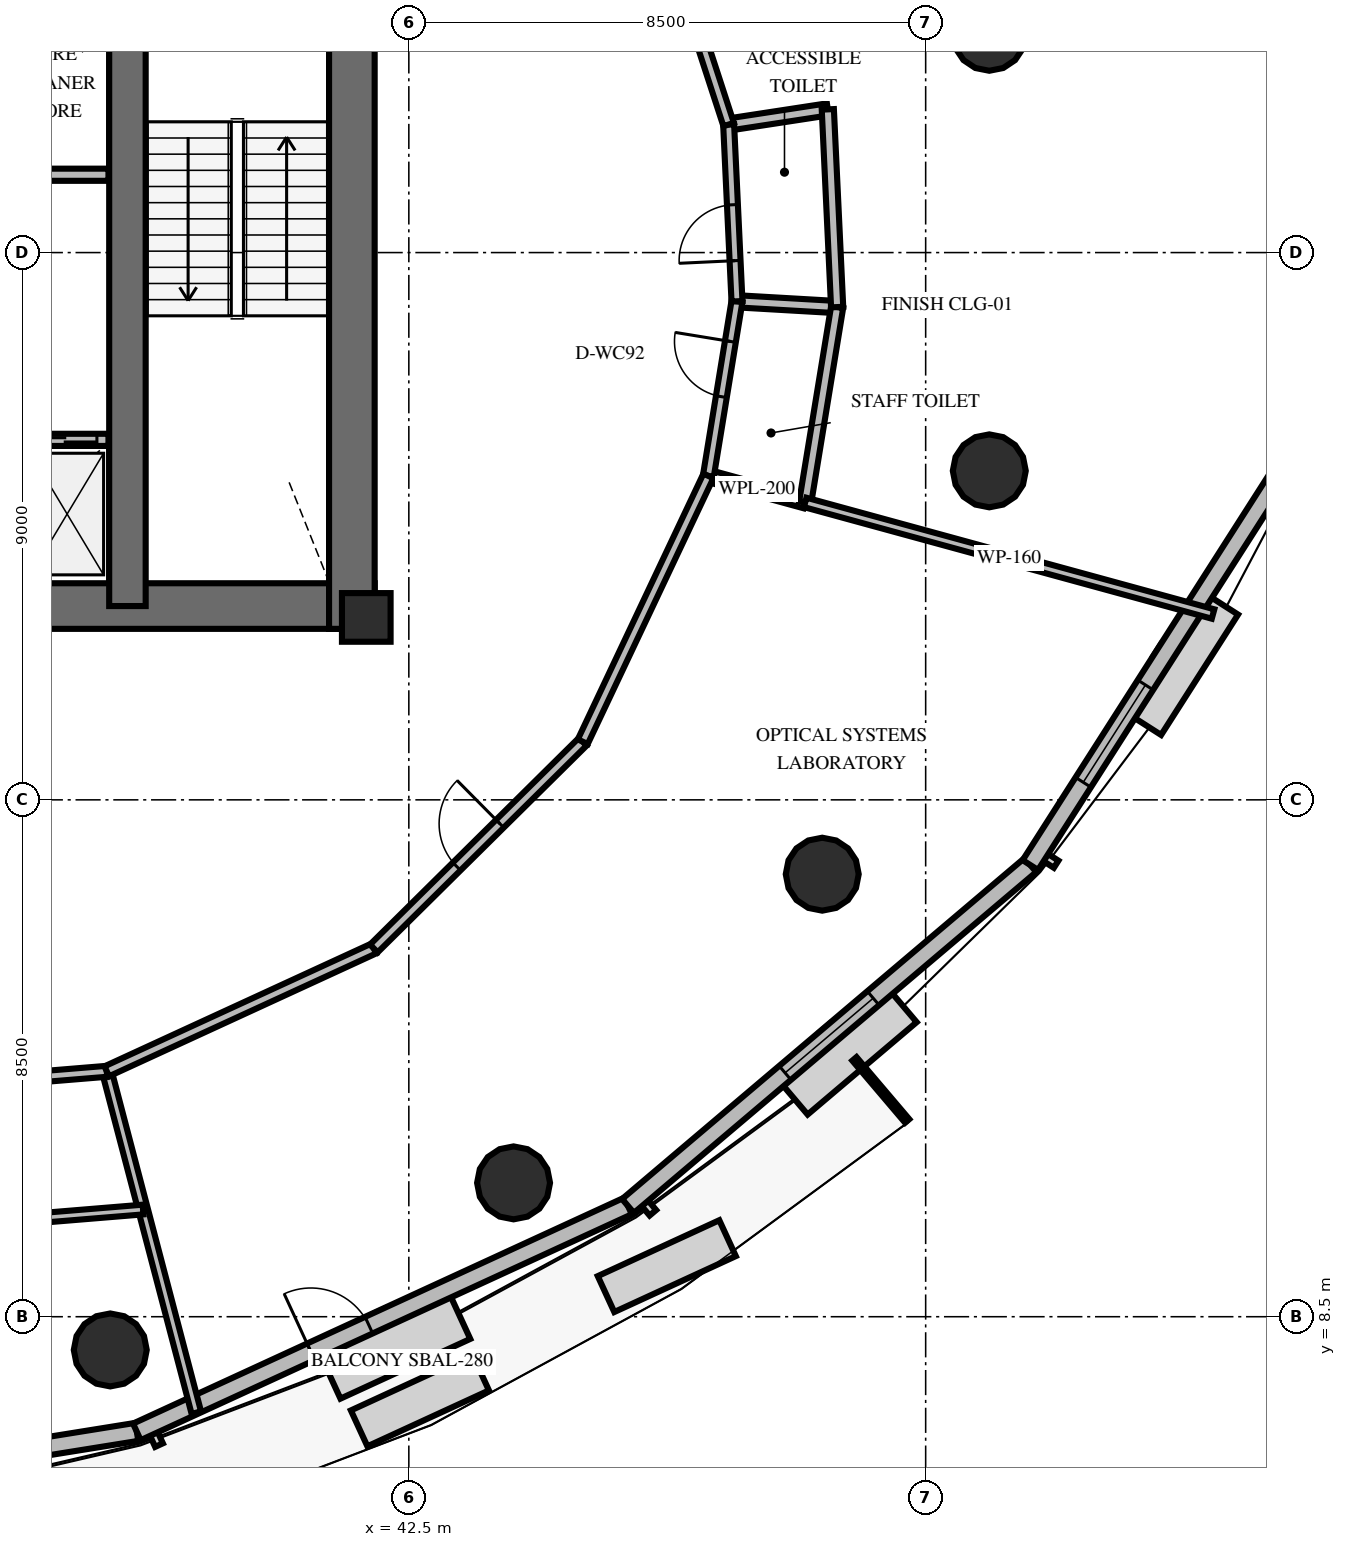
"""IFC4 building model, lengths in metres.
Left out: names, types, materials, properties, quantities, classifications, styles, units other than length and angle.
Written with IfcOpenShell. Run it as: python <this file> out.ifc"""

import sys

from ifc_helpers import new_model, si_unit, direction, frame, frame_2d, origin, origin_2d, place, context, subcontext, project, spatial, rectangle, circle, extrude, element, fill, save


model = new_model("IFC4")
c1 = context("Model", 3, precision=1e-05, world=origin(), true_north=direction((0.0, 1.0)))
c2 = subcontext(c1, "Body", "Model", "MODEL_VIEW")
j1 = project(units=[si_unit("LENGTHUNIT", "METRE"), si_unit("PLANEANGLEUNIT", "RADIAN")], contexts=[c1])
p1 = place(None, origin())
s1 = spatial("IfcSite", under=j1, at=p1, CompositionType="ELEMENT")
p2 = place(p1, origin())
s2 = spatial("IfcBuilding", under=s1, at=p2, CompositionType="ELEMENT")
p3 = place(p2, frame((0.0, 0.0, 137.8)))
s3 = spatial("IfcBuildingStorey", under=s2, at=p3, CompositionType="ELEMENT", Elevation=137.8)
p4 = place(p3, frame((26.072, 20.187, 0.0), z_axis=(0.0, 0.0, 1.0), x_axis=(1.0, 0.0, 0.0)))
e1 = element("IfcWall", 1, at=p4, inside=s3, PredefinedType="SHEAR", context=c2, shape_type="SweptSolid", body=[
    extrude(rectangle(XDim=15.866, YDim=0.75, at=frame_2d((7.933, 0.0))), origin(), (0.0, 0.0, 1.0), 4.0),
])
p5 = place(p3, frame((41.563, 19.812, 0.0), z_axis=(0.0, 0.0, 1.0), x_axis=(0.0, 1.0, 0.0)))
e2 = element("IfcWall", 2, at=p5, inside=s3, PredefinedType="SHEAR", context=c2, shape_type="SweptSolid", body=[
    extrude(rectangle(XDim=10.576, YDim=0.75, at=frame_2d((5.288, 0.0))), origin(), (0.0, 0.0, 1.0), 4.0),
])
p6 = place(p3, frame((37.872, 20.187, 0.0), z_axis=(0.0, 0.0, 1.0), x_axis=(0.0, 1.0, 0.0)))
e3 = element("IfcWall", 3, at=p6, inside=s3, PredefinedType="SHEAR", context=c2, shape_type="SweptSolid", body=[
    extrude(rectangle(XDim=9.826, YDim=0.6, at=frame_2d((4.913, 0.0))), origin(), (0.0, 0.0, 1.0), 4.0),
])
p7 = place(p3, frame((41.8, 20.0, 0.0), z_axis=(0.0, 0.0, 1.0), x_axis=(1.0, 0.0, 0.0)))
e4 = element("IfcColumn", 4, at=p7, inside=s3, PredefinedType="PILASTER", context=c2, shape_type="SweptSolid", body=[
    extrude(rectangle(XDim=0.8, YDim=0.8, at=origin_2d()), origin(), (0.0, 0.0, 1.0), 4.0),
])
for number, where, z_axis, x_axis in (
    (5, (52.046, 29.59, 0.0), (0.0, 0.0, 1.0), (1.0, 0.0, 0.0)),
    (6, (37.59, 7.954, 0.0), (0.0, 0.0, 1.0), (1.0, 0.0, 0.0)),
    (7, (44.222, 10.701, 0.0), (0.0, 0.0, 1.0), (1.0, 0.0, 0.0)),
    (8, (49.299, 15.778, 0.0), (0.0, 0.0, 1.0), (1.0, 0.0, 0.0)),
    (9, (52.046, 22.41, 0.0), (0.0, 0.0, 1.0), (1.0, 0.0, 0.0)),
):
    element("IfcColumn", number, at=place(p3, frame(where, z_axis=z_axis, x_axis=x_axis)), inside=s3, PredefinedType="COLUMN", context=c2, shape_type="SweptSolid", body=[
        extrude(circle(Radius=0.6, at=origin_2d()), origin(), (0.0, 0.0, 1.0), 4.0),
    ])
p8 = place(p3, frame((29.464, 5.23, 0.0), z_axis=(0.0, 0.0, 1.0), x_axis=(0.987334308652, 0.158653594217, 0.0)))
e10 = element("IfcWall", 10, at=p8, inside=s3, PredefinedType="SOLIDWALL", context=c2, shape_type="SweptSolid", body=[
    extrude(rectangle(XDim=8.673, YDim=0.3, at=frame_2d((4.336, 0.0))), origin(), (0.0, 0.0, 1.0), 2.9),
])
p9 = place(p8, frame((3.386, 0.0, 0.8)))
e11 = element("IfcOpeningElement", 11, at=p9, cuts=e10, PredefinedType="OPENING", context=c2, shape_type="SweptSolid", body=[
    extrude(rectangle(XDim=1.9, YDim=1.95, at=frame_2d((0.95, 0.975))), frame((0.0, 0.16, 0.0), z_axis=(0.0, -1.0, 0.0), x_axis=(1.0, 0.0, 0.0)), (0.0, 0.0, 1.0), 0.32),
])
p10 = place(p3, frame((38.027, 6.606, 0.0), z_axis=(0.0, 0.0, 1.0), x_axis=(0.908512345051, 0.417858012835, 0.0)))
e12 = element("IfcWall", 12, at=p10, inside=s3, PredefinedType="SOLIDWALL", context=c2, shape_type="SweptSolid", body=[
    extrude(rectangle(XDim=8.891, YDim=0.3, at=frame_2d((4.445, 0.0))), origin(), (0.0, 0.0, 1.0), 2.9),
])
p11 = place(p10, frame((3.15, 0.0, 0.0)))
e13 = element("IfcOpeningElement", 13, at=p11, cuts=e12, PredefinedType="OPENING", context=c2, shape_type="SweptSolid", body=[
    extrude(rectangle(XDim=1.05, YDim=2.15, at=frame_2d((0.525, 1.075))), frame((0.0, 0.16, 0.0), z_axis=(0.0, -1.0, 0.0), x_axis=(1.0, 0.0, 0.0)), (0.0, 0.0, 1.0), 0.32),
])
p12 = place(p3, frame((46.104, 10.321, 0.0), z_axis=(0.0, 0.0, 1.0), x_axis=(0.762985724951, 0.646415333606, 0.0)))
e14 = element("IfcWall", 14, at=p12, inside=s3, PredefinedType="SOLIDWALL", context=c2, shape_type="SweptSolid", body=[
    extrude(rectangle(XDim=8.673, YDim=0.3, at=frame_2d((4.336, 0.0))), origin(), (0.0, 0.0, 1.0), 2.9),
])
p13 = place(p12, frame((3.386, 0.0, 0.8)))
e15 = element("IfcOpeningElement", 15, at=p13, cuts=e14, PredefinedType="OPENING", context=c2, shape_type="SweptSolid", body=[
    extrude(rectangle(XDim=1.9, YDim=1.95, at=frame_2d((0.95, 0.975))), frame((0.0, 0.16, 0.0), z_axis=(0.0, -1.0, 0.0), x_axis=(1.0, 0.0, 0.0)), (0.0, 0.0, 1.0), 0.32),
])
p14 = place(p3, frame((52.722, 15.927, 0.0), z_axis=(0.0, 0.0, 1.0), x_axis=(0.538505872867, 0.842621756714, 0.0)))
e16 = element("IfcWall", 16, at=p14, inside=s3, PredefinedType="SOLIDWALL", context=c2, shape_type="SweptSolid", body=[
    extrude(rectangle(XDim=8.095, YDim=0.3, at=frame_2d((4.048, 0.0))), origin(), (0.0, 0.0, 1.0), 2.9),
])
p15 = place(p14, frame((1.615, 0.0, 0.8)))
e17 = element("IfcOpeningElement", 17, at=p15, cuts=e16, PredefinedType="OPENING", context=c2, shape_type="SweptSolid", body=[
    extrude(rectangle(XDim=1.9, YDim=1.95, at=frame_2d((0.95, 0.975))), frame((0.0, 0.16, 0.0), z_axis=(0.0, -1.0, 0.0), x_axis=(1.0, 0.0, 0.0)), (0.0, 0.0, 1.0), 0.32),
])
p16 = place(p3, frame((34.75, 22.92, 0.0), z_axis=(0.0, 0.0, 1.0), x_axis=(1.0, 0.0, 0.0)))
e18 = element("IfcWall", 18, at=p16, inside=s3, PredefinedType="SOLIDWALL", context=c2, shape_type="SweptSolid", body=[
    extrude(rectangle(XDim=2.81, YDim=0.2, at=frame_2d((1.405, 0.0))), origin(), (0.0, 0.0, 1.0), 2.8),
])
p17 = place(p16, frame((0.19, 0.0, 0.0)))
e19 = element("IfcOpeningElement", 19, at=p17, cuts=e18, PredefinedType="OPENING", context=c2, shape_type="SweptSolid", body=[
    extrude(rectangle(XDim=1.05, YDim=2.1, at=frame_2d((0.525, 1.05))), frame((0.0, 0.11, 0.0), z_axis=(0.0, -1.0, 0.0), x_axis=(1.0, 0.0, 0.0)), (0.0, 0.0, 1.0), 0.22),
])
p18 = place(p16, frame((1.57, 0.0, 0.0)))
e20 = element("IfcOpeningElement", 20, at=p18, cuts=e18, PredefinedType="OPENING", context=c2, shape_type="SweptSolid", body=[
    extrude(rectangle(XDim=1.05, YDim=2.1, at=frame_2d((0.525, 1.05))), frame((0.0, 0.11, 0.0), z_axis=(0.0, -1.0, 0.0), x_axis=(1.0, 0.0, 0.0)), (0.0, 0.0, 1.0), 0.22),
])
p19 = place(p3, frame((34.75, 27.28, 0.0), z_axis=(0.0, 0.0, 1.0), x_axis=(1.0, 0.0, 0.0)))
e21 = element("IfcWall", 21, at=p19, inside=s3, PredefinedType="SOLIDWALL", context=c2, shape_type="SweptSolid", body=[
    extrude(rectangle(XDim=2.81, YDim=0.2, at=frame_2d((1.405, 0.0))), origin(), (0.0, 0.0, 1.0), 2.8),
])
p20 = place(p3, frame((47.427, 22.327, 0.0), z_axis=(0.0, 0.0, 1.0), x_axis=(0.96458264851, -0.2637808071, 0.0)))
e22 = element("IfcWall", 22, at=p20, inside=s3, PredefinedType="PLUMBINGWALL", context=c2, shape_type="SweptSolid", body=[
    extrude(rectangle(XDim=1.65, YDim=0.2, at=frame_2d((0.825, 0.0))), origin(), (0.0, 0.0, 1.0), 2.8),
])
p21 = place(p3, frame((47.897, 25.199, 0.0), z_axis=(0.0, 0.0, 1.0), x_axis=(0.998342068073, -0.0575596657, 0.0)))
e23 = element("IfcWall", 23, at=p21, inside=s3, PredefinedType="PLUMBINGWALL", context=c2, shape_type="SweptSolid", body=[
    extrude(rectangle(XDim=1.65, YDim=0.2, at=frame_2d((0.825, 0.0))), origin(), (0.0, 0.0, 1.0), 2.8),
])
p22 = place(p3, frame((49.018, 21.892, 0.0), z_axis=(0.0, 0.0, 1.0), x_axis=(0.161564274582, 0.986862191584, 0.0)))
e24 = element("IfcWall", 24, at=p22, inside=s3, PredefinedType="PLUMBINGWALL", context=c2, shape_type="SweptSolid", body=[
    extrude(rectangle(XDim=3.255, YDim=0.2, at=frame_2d((1.627, 0.0))), origin(), (0.0, 0.0, 1.0), 2.8),
])
p23 = place(p3, frame((47.427, 22.327, 0.0), z_axis=(0.0, 0.0, 1.0), x_axis=(0.161663862562, 0.986845882365, 0.0)))
e25 = element("IfcWall", 25, at=p23, inside=s3, PredefinedType="PARTITIONING", context=c2, shape_type="SweptSolid", body=[
    extrude(rectangle(XDim=2.91, YDim=0.18, at=frame_2d((1.455, 0.0))), origin(), (0.0, 0.0, 1.0), 2.8),
])
p24 = place(p23, frame((1.321, 0.0, 0.0)))
e26 = element("IfcOpeningElement", 26, at=p24, cuts=e25, PredefinedType="OPENING", context=c2, shape_type="SweptSolid", body=[
    extrude(rectangle(XDim=0.92, YDim=2.1, at=frame_2d((0.46, 1.05))), frame((0.0, 0.1, 0.0), z_axis=(0.0, -1.0, 0.0), x_axis=(1.0, 0.0, 0.0)), (0.0, 0.0, 1.0), 0.2),
])
p25 = place(p3, frame((47.76, 28.106, 0.0), z_axis=(0.0, 0.0, 1.0), x_axis=(0.98852343901, 0.15106756941, 0.0)))
e27 = element("IfcWall", 27, at=p25, inside=s3, PredefinedType="PLUMBINGWALL", context=c2, shape_type="SweptSolid", body=[
    extrude(rectangle(XDim=1.65, YDim=0.2, at=frame_2d((0.825, 0.0))), origin(), (0.0, 0.0, 1.0), 2.8),
])
p26 = place(p3, frame((49.544, 25.104, 0.0), z_axis=(0.0, 0.0, 1.0), x_axis=(-0.04710541954, 0.99888992359, 0.0)))
e28 = element("IfcWall", 28, at=p26, inside=s3, PredefinedType="PLUMBINGWALL", context=c2, shape_type="SweptSolid", body=[
    extrude(rectangle(XDim=3.255, YDim=0.2, at=frame_2d((1.627, 0.0))), origin(), (0.0, 0.0, 1.0), 2.8),
])
p27 = place(p3, frame((47.897, 25.199, 0.0), z_axis=(0.0, 0.0, 1.0), x_axis=(-0.047146640138, 0.998887978866, 0.0)))
e29 = element("IfcWall", 29, at=p27, inside=s3, PredefinedType="PARTITIONING", context=c2, shape_type="SweptSolid", body=[
    extrude(rectangle(XDim=2.91, YDim=0.18, at=frame_2d((1.455, 0.0))), origin(), (0.0, 0.0, 1.0), 2.8),
])
p28 = place(p27, frame((0.669, 0.0, 0.0)))
e30 = element("IfcOpeningElement", 30, at=p28, cuts=e29, PredefinedType="OPENING", context=c2, shape_type="SweptSolid", body=[
    extrude(rectangle(XDim=0.92, YDim=2.1, at=frame_2d((0.46, 1.05))), frame((0.0, 0.1, 0.0), z_axis=(0.0, -1.0, 0.0), x_axis=(1.0, 0.0, 0.0)), (0.0, 0.0, 1.0), 0.2),
])
p29 = place(p3, frame((49.018, 21.892, 0.0), z_axis=(0.0, 0.0, 1.0), x_axis=(0.964556137178, -0.263877733492, 0.0)))
e31 = element("IfcWall", 31, at=p29, inside=s3, PredefinedType="PARTITIONING", context=c2, shape_type="SweptSolid", body=[
    extrude(rectangle(XDim=6.955, YDim=0.16, at=frame_2d((3.478, 0.0))), origin(), (0.0, 0.0, 1.0), 2.8),
])
p30 = place(p3, frame((47.76, 28.106, 0.0), z_axis=(0.0, 0.0, 1.0), x_axis=(-0.309584910411, 0.950871801688, 0.0)))
e32 = element("IfcWall", 32, at=p30, inside=s3, PredefinedType="PARTITIONING", context=c2, shape_type="SweptSolid", body=[
    extrude(rectangle(XDim=4.515, YDim=0.18, at=frame_2d((2.257, 0.0))), origin(), (0.0, 0.0, 1.0), 2.8),
])
p31 = place(p30, frame((2.561, 0.0, 0.0)))
e33 = element("IfcOpeningElement", 33, at=p31, cuts=e32, PredefinedType="OPENING", context=c2, shape_type="SweptSolid", body=[
    extrude(rectangle(XDim=1.0, YDim=2.15, at=frame_2d((0.5, 1.075))), frame((0.0, 0.1, 0.0), z_axis=(0.0, -1.0, 0.0), x_axis=(1.0, 0.0, 0.0)), (0.0, 0.0, 1.0), 0.2),
])
p32 = place(p3, frame((37.532, 12.536, 0.0), z_axis=(0.0, 0.0, 1.0), x_axis=(0.253753983921, -0.967268791828, 0.0)))
e34 = element("IfcWall", 34, at=p32, inside=s3, PredefinedType="PARTITIONING", context=c2, shape_type="SweptSolid", body=[
    extrude(rectangle(XDim=5.803, YDim=0.16, at=frame_2d((2.902, 0.0))), origin(), (0.0, 0.0, 1.0), 2.8),
])
p33 = place(p3, frame((32.714, 12.139, 0.0), z_axis=(0.0, 0.0, 1.0), x_axis=(0.996635375419, 0.081962970069, 0.0)))
e35 = element("IfcWall", 35, at=p33, inside=s3, PredefinedType="PARTITIONING", context=c2, shape_type="SweptSolid", body=[
    extrude(rectangle(XDim=4.834, YDim=0.18, at=frame_2d((2.417, 0.0))), origin(), (0.0, 0.0, 1.0), 2.8),
])
p34 = place(p33, frame((1.034, 0.0, 0.0)))
e36 = element("IfcOpeningElement", 36, at=p34, cuts=e35, PredefinedType="OPENING", context=c2, shape_type="SweptSolid", body=[
    extrude(rectangle(XDim=1.0, YDim=2.15, at=frame_2d((0.5, 1.075))), frame((0.0, 0.1, 0.0), z_axis=(0.0, -1.0, 0.0), x_axis=(1.0, 0.0, 0.0)), (0.0, 0.0, 1.0), 0.2),
])
p35 = place(p3, frame((32.497, 9.8, 0.0), z_axis=(0.0, 0.0, 1.0), x_axis=(0.996635455181, 0.081962000194, 0.0)))
e37 = element("IfcWall", 37, at=p35, inside=s3, PredefinedType="PARTITIONING", context=c2, shape_type="SweptSolid", body=[
    extrude(rectangle(XDim=5.651, YDim=0.16, at=frame_2d((2.825, 0.0))), origin(), (0.0, 0.0, 1.0), 2.8),
])
p36 = place(p35, frame((1.265, 0.0, 0.0)))
e38 = element("IfcOpeningElement", 38, at=p36, cuts=e37, PredefinedType="OPENING", context=c2, shape_type="SweptSolid", body=[
    extrude(rectangle(XDim=0.95, YDim=2.15, at=frame_2d((0.475, 1.075))), frame((0.0, 0.09, 0.0), z_axis=(0.0, -1.0, 0.0), x_axis=(1.0, 0.0, 0.0)), (0.0, 0.0, 1.0), 0.18),
])
p37 = place(p3, frame((37.532, 12.536, 0.0), z_axis=(0.0, 0.0, 1.0), x_axis=(0.90849812175, 0.417888935935, 0.0)))
e39 = element("IfcWall", 39, at=p37, inside=s3, PredefinedType="PARTITIONING", context=c2, shape_type="SweptSolid", body=[
    extrude(rectangle(XDim=4.834, YDim=0.18, at=frame_2d((2.417, 0.0))), origin(), (0.0, 0.0, 1.0), 2.8),
])
p38 = place(p3, frame((41.924, 14.556, 0.0), z_axis=(0.0, 0.0, 1.0), x_axis=(0.710808900414, 0.703385176907, 0.0)))
e40 = element("IfcWall", 40, at=p38, inside=s3, PredefinedType="PARTITIONING", context=c2, shape_type="SweptSolid", body=[
    extrude(rectangle(XDim=4.834, YDim=0.18, at=frame_2d((2.417, 0.0))), origin(), (0.0, 0.0, 1.0), 2.8),
])
p39 = place(p38, frame((1.917, 0.0, 0.0)))
e41 = element("IfcOpeningElement", 41, at=p39, cuts=e40, PredefinedType="OPENING", context=c2, shape_type="SweptSolid", body=[
    extrude(rectangle(XDim=1.0, YDim=2.15, at=frame_2d((0.5, 1.075))), frame((0.0, 0.1, 0.0), z_axis=(0.0, -1.0, 0.0), x_axis=(1.0, 0.0, 0.0)), (0.0, 0.0, 1.0), 0.2),
])
p40 = place(p3, frame((45.361, 17.956, 0.0), z_axis=(0.0, 0.0, 1.0), x_axis=(0.427348095513, 0.904087166849, 0.0)))
e42 = element("IfcWall", 42, at=p40, inside=s3, PredefinedType="PARTITIONING", context=c2, shape_type="SweptSolid", body=[
    extrude(rectangle(XDim=4.834, YDim=0.18, at=frame_2d((2.417, 0.0))), origin(), (0.0, 0.0, 1.0), 2.8),
])
p41 = place(p11, origin())
e43 = element("IfcDoor", 43, at=p41, inside=s3, OperationType="SINGLE_SWING_LEFT", PredefinedType="DOOR", context=c2, shape_type="SweptSolid", body=[
    extrude(rectangle(XDim=1.05, YDim=2.15, at=frame_2d((0.525, 1.075))), frame((0.0, 0.025, 0.0), z_axis=(0.0, -1.0, 0.0), x_axis=(1.0, 0.0, 0.0)), (0.0, 0.0, 1.0), 0.05),
])
fill(e13, e43)
p42 = place(p13, origin())
e44 = element("IfcWindow", 44, at=p42, inside=s3, PartitioningType="SINGLE_PANEL", PredefinedType="WINDOW", context=c2, shape_type="SweptSolid", body=[
    extrude(rectangle(XDim=1.9, YDim=1.95, at=frame_2d((0.95, 0.975))), frame((0.0, 0.03, 0.0), z_axis=(0.0, -1.0, 0.0), x_axis=(1.0, 0.0, 0.0)), (0.0, 0.0, 1.0), 0.06),
])
fill(e15, e44)
p43 = place(p15, origin())
e45 = element("IfcWindow", 45, at=p43, inside=s3, PartitioningType="SINGLE_PANEL", PredefinedType="WINDOW", context=c2, shape_type="SweptSolid", body=[
    extrude(rectangle(XDim=1.9, YDim=1.95, at=frame_2d((0.95, 0.975))), frame((0.0, 0.03, 0.0), z_axis=(0.0, -1.0, 0.0), x_axis=(1.0, 0.0, 0.0)), (0.0, 0.0, 1.0), 0.06),
])
fill(e17, e45)
p44 = place(p18, origin())
e46 = element("IfcDoor", 46, at=p44, inside=s3, OperationType="DOUBLE_DOOR_SLIDING", PredefinedType="USERDEFINED", context=c2, shape_type="SweptSolid", body=[
    extrude(rectangle(XDim=1.05, YDim=2.1, at=frame_2d((0.525, 1.05))), frame((0.0, 0.025, 0.0), z_axis=(0.0, -1.0, 0.0), x_axis=(1.0, 0.0, 0.0)), (0.0, 0.0, 1.0), 0.05),
])
fill(e20, e46)
p45 = place(p24, origin())
e47 = element("IfcDoor", 47, at=p45, inside=s3, OperationType="SINGLE_SWING_RIGHT", PredefinedType="DOOR", context=c2, shape_type="SweptSolid", body=[
    extrude(rectangle(XDim=0.92, YDim=2.1, at=frame_2d((0.46, 1.05))), frame((0.0, 0.025, 0.0), z_axis=(0.0, -1.0, 0.0), x_axis=(1.0, 0.0, 0.0)), (0.0, 0.0, 1.0), 0.05),
])
fill(e26, e47)
p46 = place(p28, origin())
e48 = element("IfcDoor", 48, at=p46, inside=s3, OperationType="SINGLE_SWING_LEFT", PredefinedType="DOOR", context=c2, shape_type="SweptSolid", body=[
    extrude(rectangle(XDim=0.92, YDim=2.1, at=frame_2d((0.46, 1.05))), frame((0.0, 0.025, 0.0), z_axis=(0.0, -1.0, 0.0), x_axis=(1.0, 0.0, 0.0)), (0.0, 0.0, 1.0), 0.05),
])
fill(e30, e48)
p47 = place(p39, origin())
e49 = element("IfcDoor", 49, at=p47, inside=s3, OperationType="SINGLE_SWING_RIGHT", PredefinedType="DOOR", context=c2, shape_type="SweptSolid", body=[
    extrude(rectangle(XDim=1.0, YDim=2.15, at=frame_2d((0.5, 1.075))), frame((0.0, 0.025, 0.0), z_axis=(0.0, -1.0, 0.0), x_axis=(1.0, 0.0, 0.0)), (0.0, 0.0, 1.0), 0.05),
])
fill(e41, e49)
save(model, sys.argv[1])
